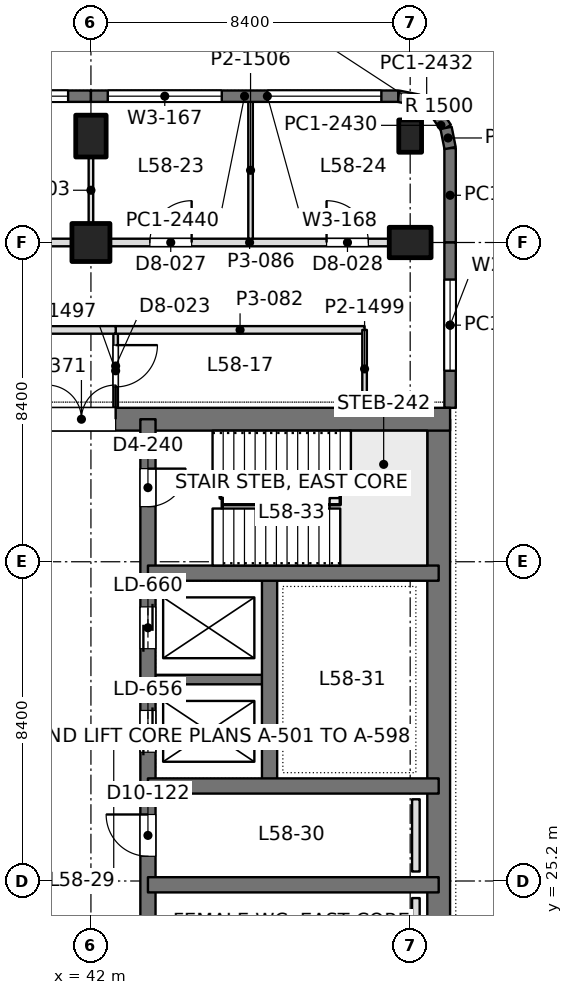
"""IFC4 building model, lengths in metres.
Left out: names, types, materials, properties, quantities, classifications, styles, units other than length and angle.
Written with IfcOpenShell. Run it as: python <this file> out.ifc"""

import sys

from ifc_helpers import new_model, si_unit, direction, frame, frame_2d, origin, origin_2d, place, context, subcontext, project, spatial, rectangle, extrude, element, fill, save


model = new_model("IFC4")
c1 = context("Model", 3, precision=1e-05, world=origin(), true_north=direction((0.0, 1.0)))
c2 = subcontext(c1, "Body", "Model", "MODEL_VIEW")
j1 = project(units=[si_unit("LENGTHUNIT", "METRE"), si_unit("PLANEANGLEUNIT", "RADIAN")], contexts=[c1])
p1 = place(None, origin())
s1 = spatial("IfcSite", under=j1, at=p1, CompositionType="ELEMENT")
p2 = place(p1, origin())
s2 = spatial("IfcBuilding", under=s1, at=p2, CompositionType="ELEMENT")
p3 = place(p2, frame((0.0, 0.0, 254.7)))
s3 = spatial("IfcBuildingStorey", under=s2, at=p3, CompositionType="ELEMENT", Elevation=254.7)
p4 = place(p3, frame((42.0, 42.0, 0.0), z_axis=(0.0, 0.0, 1.0), x_axis=(1.0, 0.0, 0.0)))
e1 = element("IfcColumn", 1, at=p4, inside=s3, PredefinedType="COLUMN", context=c2, shape_type="SweptSolid", body=[
    extrude(rectangle(XDim=1.0, YDim=1.0, at=origin_2d()), origin(), (0.0, 0.0, 1.0), 4.5),
])
for number, where, z_axis, x_axis in (
    (2, (42.0, 44.8, 0.0), (0.0, 0.0, 1.0), (1.0, 0.0, 0.0)),
    (3, (50.4, 42.0, 0.0), (0.0, 0.0, 1.0), (0.0, 1.0, 0.0)),
):
    element("IfcColumn", number, at=place(p3, frame(where, z_axis=z_axis, x_axis=x_axis)), inside=s3, PredefinedType="COLUMN", context=c2, shape_type="SweptSolid", body=[
        extrude(rectangle(XDim=0.8, YDim=1.1, at=origin_2d()), origin(), (0.0, 0.0, 1.0), 4.5),
    ])
p5 = place(p3, frame((50.4, 44.8, 0.0), z_axis=(0.0, 0.0, 1.0), x_axis=(1.0, 0.0, 0.0)))
e4 = element("IfcColumn", 4, at=p5, inside=s3, PredefinedType="COLUMN", context=c2, shape_type="SweptSolid", body=[
    extrude(rectangle(XDim=0.6, YDim=0.85, at=origin_2d()), origin(), (0.0, 0.0, 1.0), 4.5),
])
p6 = place(p3, frame((33.75, 37.35, 0.0), z_axis=(0.0, 0.0, 1.0), x_axis=(1.0, 0.0, 0.0)))
e5 = element("IfcWall", 5, at=p6, inside=s3, PredefinedType="SHEAR", context=c2, shape_type="SweptSolid", body=[
    extrude(rectangle(XDim=17.7, YDim=0.6, at=frame_2d((8.85, 0.0))), origin(), (0.0, 0.0, 1.0), 4.5),
])
p7 = place(p6, frame((7.1, 0.0, 0.0)))
e6 = element("IfcOpeningElement", 6, at=p7, cuts=e5, PredefinedType="OPENING", context=c2, shape_type="SweptSolid", body=[
    extrude(rectangle(XDim=1.8, YDim=2.4, at=frame_2d((0.9, 1.2))), frame((0.0, 0.31, 0.0), z_axis=(0.0, -1.0, 0.0), x_axis=(1.0, 0.0, 0.0)), (0.0, 0.0, 1.0), 0.62),
])
p8 = place(p3, frame((51.15, 13.05, 0.0), z_axis=(0.0, 0.0, 1.0), x_axis=(0.0, 1.0, 0.0)))
e7 = element("IfcWall", 7, at=p8, inside=s3, PredefinedType="SHEAR", context=c2, shape_type="SweptSolid", body=[
    extrude(rectangle(XDim=24.3, YDim=0.6, at=frame_2d((12.15, 0.0))), origin(), (0.0, 0.0, 1.0), 4.5),
])
p9 = place(p3, frame((43.5, 13.05, 0.0), z_axis=(0.0, 0.0, 1.0), x_axis=(0.0, 1.0, 0.0)))
e8 = element("IfcWall", 8, at=p9, inside=s3, PredefinedType="SHEAR", context=c2, shape_type="SweptSolid", body=[
    extrude(rectangle(XDim=24.3, YDim=0.4, at=frame_2d((12.15, 0.0))), origin(), (0.0, 0.0, 1.0), 4.5),
])
p10 = place(p9, frame((1.3, 0.0, 0.0)))
e9 = element("IfcOpeningElement", 9, at=p10, cuts=e8, PredefinedType="OPENING", context=c2, shape_type="SweptSolid", body=[
    extrude(rectangle(XDim=1.0, YDim=2.2, at=frame_2d((0.5, 1.1))), frame((0.0, 0.21, 0.0), z_axis=(0.0, -1.0, 0.0), x_axis=(1.0, 0.0, 0.0)), (0.0, 0.0, 1.0), 0.42),
])
p11 = place(p9, frame((22.0, 0.0, 0.0)))
e10 = element("IfcOpeningElement", 10, at=p11, cuts=e8, PredefinedType="OPENING", context=c2, shape_type="SweptSolid", body=[
    extrude(rectangle(XDim=1.0, YDim=2.2, at=frame_2d((0.5, 1.1))), frame((0.0, 0.21, 0.0), z_axis=(0.0, -1.0, 0.0), x_axis=(1.0, 0.0, 0.0)), (0.0, 0.0, 1.0), 0.42),
])
p12 = place(p9, frame((5.55, 0.0, 0.0)))
e11 = element("IfcOpeningElement", 11, at=p12, cuts=e8, PredefinedType="OPENING", context=c2, shape_type="SweptSolid", body=[
    extrude(rectangle(XDim=1.0, YDim=2.2, at=frame_2d((0.5, 1.1))), frame((0.0, 0.21, 0.0), z_axis=(0.0, -1.0, 0.0), x_axis=(1.0, 0.0, 0.0)), (0.0, 0.0, 1.0), 0.42),
])
p13 = place(p9, frame((9.55, 0.0, 0.0)))
e12 = element("IfcOpeningElement", 12, at=p13, cuts=e8, PredefinedType="OPENING", context=c2, shape_type="SweptSolid", body=[
    extrude(rectangle(XDim=1.0, YDim=2.2, at=frame_2d((0.5, 1.1))), frame((0.0, 0.21, 0.0), z_axis=(0.0, -1.0, 0.0), x_axis=(1.0, 0.0, 0.0)), (0.0, 0.0, 1.0), 0.42),
])
p14 = place(p9, frame((12.8, 0.0, 0.0)))
e13 = element("IfcOpeningElement", 13, at=p14, cuts=e8, PredefinedType="OPENING", context=c2, shape_type="SweptSolid", body=[
    extrude(rectangle(XDim=1.1, YDim=2.2, at=frame_2d((0.55, 1.1))), frame((0.0, 0.21, 0.0), z_axis=(0.0, -1.0, 0.0), x_axis=(1.0, 0.0, 0.0)), (0.0, 0.0, 1.0), 0.42),
])
p15 = place(p9, frame((15.538, 0.0, 0.0)))
e14 = element("IfcOpeningElement", 14, at=p15, cuts=e8, PredefinedType="OPENING", context=c2, shape_type="SweptSolid", body=[
    extrude(rectangle(XDim=1.1, YDim=2.2, at=frame_2d((0.55, 1.1))), frame((0.0, 0.21, 0.0), z_axis=(0.0, -1.0, 0.0), x_axis=(1.0, 0.0, 0.0)), (0.0, 0.0, 1.0), 0.42),
])
p16 = place(p9, frame((18.262, 0.0, 0.0)))
e15 = element("IfcOpeningElement", 15, at=p16, cuts=e8, PredefinedType="OPENING", context=c2, shape_type="SweptSolid", body=[
    extrude(rectangle(XDim=1.1, YDim=2.2, at=frame_2d((0.55, 1.1))), frame((0.0, 0.21, 0.0), z_axis=(0.0, -1.0, 0.0), x_axis=(1.0, 0.0, 0.0)), (0.0, 0.0, 1.0), 0.42),
])
for number, where, z_axis, x_axis in (
    (16, (51.15, 25.1, 0.0), (0.0, 0.0, 1.0), (-1.0, 0.0, 0.0)),
    (17, (51.15, 27.7, 0.0), (0.0, 0.0, 1.0), (-1.0, 0.0, 0.0)),
    (18, (51.15, 33.3, 0.0), (0.0, 0.0, 1.0), (-1.0, 0.0, 0.0)),
):
    element("IfcWall", number, at=place(p3, frame(where, z_axis=z_axis, x_axis=x_axis)), inside=s3, PredefinedType="SHEAR", context=c2, shape_type="SweptSolid", body=[
        extrude(rectangle(XDim=7.65, YDim=0.4, at=frame_2d((3.825, 0.0))), origin(), (0.0, 0.0, 1.0), 4.5),
    ])
p17 = place(p3, frame((46.7, 27.7, 0.0), z_axis=(0.0, 0.0, 1.0), x_axis=(0.0, 1.0, 0.0)))
e19 = element("IfcWall", 19, at=p17, inside=s3, PredefinedType="SHEAR", context=c2, shape_type="SweptSolid", body=[
    extrude(rectangle(XDim=5.6, YDim=0.4, at=frame_2d((2.8, 0.0))), origin(), (0.0, 0.0, 1.0), 4.5),
])
p18 = place(p3, frame((46.7, 30.5, 0.0), z_axis=(0.0, 0.0, 1.0), x_axis=(-1.0, 0.0, 0.0)))
e20 = element("IfcWall", 20, at=p18, inside=s3, PredefinedType="SHEAR", context=c2, shape_type="SweptSolid", body=[
    extrude(rectangle(XDim=3.2, YDim=0.25, at=frame_2d((1.6, 0.0))), origin(), (0.0, 0.0, 1.0), 4.5),
])
p19 = place(p3, frame((33.6, 45.85, 0.0), z_axis=(0.0, 0.0, 1.0), x_axis=(1.0, 0.0, 0.0)))
e21 = element("IfcWall", 21, at=p19, inside=s3, PredefinedType="SOLIDWALL", context=c2, shape_type="SweptSolid", body=[
    extrude(rectangle(XDim=8.4, YDim=0.3, at=frame_2d((4.2, 0.0))), origin(), (0.0, 0.0, 1.0), 4.35),
])
p20 = place(p19, frame((0.6, 0.0, 0.9)))
e22 = element("IfcOpeningElement", 22, at=p20, cuts=e21, PredefinedType="OPENING", context=c2, shape_type="SweptSolid", body=[
    extrude(rectangle(XDim=3.0, YDim=2.4, at=frame_2d((1.5, 1.2))), frame((0.0, 0.16, 0.0), z_axis=(0.0, -1.0, 0.0), x_axis=(1.0, 0.0, 0.0)), (0.0, 0.0, 1.0), 0.32),
])
p21 = place(p19, frame((4.8, 0.0, 0.9)))
e23 = element("IfcOpeningElement", 23, at=p21, cuts=e21, PredefinedType="OPENING", context=c2, shape_type="SweptSolid", body=[
    extrude(rectangle(XDim=3.0, YDim=2.4, at=frame_2d((1.5, 1.2))), frame((0.0, 0.16, 0.0), z_axis=(0.0, -1.0, 0.0), x_axis=(1.0, 0.0, 0.0)), (0.0, 0.0, 1.0), 0.32),
])
p22 = place(p3, frame((42.0, 45.85, 0.0), z_axis=(0.0, 0.0, 1.0), x_axis=(1.0, 0.0, 0.0)))
e24 = element("IfcWall", 24, at=p22, inside=s3, PredefinedType="SOLIDWALL", context=c2, shape_type="SweptSolid", body=[
    extrude(rectangle(XDim=8.085, YDim=0.3, at=frame_2d((4.042, 0.0))), origin(), (0.0, 0.0, 1.0), 4.35),
])
p23 = place(p22, frame((0.443, 0.0, 0.9)))
e25 = element("IfcOpeningElement", 25, at=p23, cuts=e24, PredefinedType="OPENING", context=c2, shape_type="SweptSolid", body=[
    extrude(rectangle(XDim=3.0, YDim=2.4, at=frame_2d((1.5, 1.2))), frame((0.0, 0.16, 0.0), z_axis=(0.0, -1.0, 0.0), x_axis=(1.0, 0.0, 0.0)), (0.0, 0.0, 1.0), 0.32),
])
p24 = place(p22, frame((4.643, 0.0, 0.9)))
e26 = element("IfcOpeningElement", 26, at=p24, cuts=e24, PredefinedType="OPENING", context=c2, shape_type="SweptSolid", body=[
    extrude(rectangle(XDim=3.0, YDim=2.4, at=frame_2d((1.5, 1.2))), frame((0.0, 0.16, 0.0), z_axis=(0.0, -1.0, 0.0), x_axis=(1.0, 0.0, 0.0)), (0.0, 0.0, 1.0), 0.32),
])
p25 = place(p3, frame((50.085, 45.85, 0.0), z_axis=(0.0, 0.0, 1.0), x_axis=(0.980702050465, -0.1955082817, 0.0)))
e27 = element("IfcWall", 27, at=p25, inside=s3, PredefinedType="SOLIDWALL", context=c2, shape_type="SweptSolid", body=[
    extrude(rectangle(XDim=0.541, YDim=0.3, at=frame_2d((0.271, 0.0))), origin(), (0.0, 0.0, 1.0), 4.35),
])
p26 = place(p3, frame((50.615, 45.744, 0.0), z_axis=(0.0, 0.0, 1.0), x_axis=(0.831692711774, -0.555236195849, 0.0)))
e28 = element("IfcWall", 28, at=p26, inside=s3, PredefinedType="SOLIDWALL", context=c2, shape_type="SweptSolid", body=[
    extrude(rectangle(XDim=0.525, YDim=0.3, at=frame_2d((0.263, 0.0))), origin(), (0.0, 0.0, 1.0), 4.35),
])
p27 = place(p3, frame((51.052, 45.453, 0.0), z_axis=(0.0, 0.0, 1.0), x_axis=(0.55534295404, -0.831621430339, 0.0)))
e29 = element("IfcWall", 29, at=p27, inside=s3, PredefinedType="SOLIDWALL", context=c2, shape_type="SweptSolid", body=[
    extrude(rectangle(XDim=0.526, YDim=0.3, at=frame_2d((0.263, 0.0))), origin(), (0.0, 0.0, 1.0), 4.35),
])
p28 = place(p3, frame((51.344, 45.015, 0.0), z_axis=(0.0, 0.0, 1.0), x_axis=(0.195073962632, -0.980788534345, 0.0)))
e30 = element("IfcWall", 30, at=p28, inside=s3, PredefinedType="SOLIDWALL", context=c2, shape_type="SweptSolid", body=[
    extrude(rectangle(XDim=0.541, YDim=0.3, at=frame_2d((0.271, 0.0))), origin(), (0.0, 0.0, 1.0), 4.35),
])
p29 = place(p3, frame((51.45, 44.485, 0.0), z_axis=(0.0, 0.0, 1.0), x_axis=(0.0, -1.0, 0.0)))
e31 = element("IfcWall", 31, at=p29, inside=s3, PredefinedType="SOLIDWALL", context=c2, shape_type="SweptSolid", body=[
    extrude(rectangle(XDim=2.485, YDim=0.3, at=frame_2d((1.243, 0.0))), origin(), (0.0, 0.0, 1.0), 4.35),
])
p30 = place(p3, frame((51.45, 42.0, 0.0), z_axis=(0.0, 0.0, 1.0), x_axis=(0.0, -1.0, 0.0)))
e32 = element("IfcWall", 32, at=p30, inside=s3, PredefinedType="SOLIDWALL", context=c2, shape_type="SweptSolid", body=[
    extrude(rectangle(XDim=4.35, YDim=0.3, at=frame_2d((2.175, 0.0))), origin(), (0.0, 0.0, 1.0), 4.35),
])
p31 = place(p30, frame((0.975, 0.0, 0.9)))
e33 = element("IfcOpeningElement", 33, at=p31, cuts=e32, PredefinedType="OPENING", context=c2, shape_type="SweptSolid", body=[
    extrude(rectangle(XDim=2.4, YDim=1.9, at=frame_2d((1.2, 0.95))), frame((0.0, 0.16, 0.0), z_axis=(0.0, -1.0, 0.0), x_axis=(1.0, 0.0, 0.0)), (0.0, 0.0, 1.0), 0.32),
])
p32 = place(p3, frame((34.249, 42.0, 0.0), z_axis=(0.0, 0.0, 1.0), x_axis=(1.0, 0.0, 0.0)))
e34 = element("IfcWall", 34, at=p32, inside=s3, PredefinedType="PARTITIONING", context=c2, shape_type="SweptSolid", body=[
    extrude(rectangle(XDim=7.252, YDim=0.2, at=frame_2d((3.626, 0.0))), origin(), (0.0, 0.0, 1.0), 3.8),
])
p33 = place(p32, frame((3.001, 0.0, 0.0)))
e35 = element("IfcOpeningElement", 35, at=p33, cuts=e34, PredefinedType="OPENING", context=c2, shape_type="SweptSolid", body=[
    extrude(rectangle(XDim=1.1, YDim=2.4, at=frame_2d((0.55, 1.2))), frame((0.0, 0.11, 0.0), z_axis=(0.0, -1.0, 0.0), x_axis=(1.0, 0.0, 0.0)), (0.0, 0.0, 1.0), 0.22),
])
p34 = place(p3, frame((42.499, 42.0, 0.0), z_axis=(0.0, 0.0, 1.0), x_axis=(1.0, 0.0, 0.0)))
e36 = element("IfcWall", 36, at=p34, inside=s3, PredefinedType="PARTITIONING", context=c2, shape_type="SweptSolid", body=[
    extrude(rectangle(XDim=7.352, YDim=0.2, at=frame_2d((3.676, 0.0))), origin(), (0.0, 0.0, 1.0), 3.8),
])
p35 = place(p34, frame((1.051, 0.0, 0.0)))
e37 = element("IfcOpeningElement", 37, at=p35, cuts=e36, PredefinedType="OPENING", context=c2, shape_type="SweptSolid", body=[
    extrude(rectangle(XDim=1.1, YDim=2.4, at=frame_2d((0.55, 1.2))), frame((0.0, 0.11, 0.0), z_axis=(0.0, -1.0, 0.0), x_axis=(1.0, 0.0, 0.0)), (0.0, 0.0, 1.0), 0.22),
])
p36 = place(p34, frame((5.701, 0.0, 0.0)))
e38 = element("IfcOpeningElement", 38, at=p36, cuts=e36, PredefinedType="OPENING", context=c2, shape_type="SweptSolid", body=[
    extrude(rectangle(XDim=1.1, YDim=2.4, at=frame_2d((0.55, 1.2))), frame((0.0, 0.11, 0.0), z_axis=(0.0, -1.0, 0.0), x_axis=(1.0, 0.0, 0.0)), (0.0, 0.0, 1.0), 0.22),
])
p37 = place(p3, frame((42.0, 42.499, 0.0), z_axis=(0.0, 0.0, 1.0), x_axis=(0.0, 1.0, 0.0)))
e39 = element("IfcWall", 39, at=p37, inside=s3, PredefinedType="PARTITIONING", context=c2, shape_type="SweptSolid", body=[
    extrude(rectangle(XDim=1.752, YDim=0.12, at=frame_2d((0.876, 0.0))), origin(), (0.0, 0.0, 1.0), 3.99),
])
p38 = place(p3, frame((46.2, 42.098, 0.0), z_axis=(0.0, 0.0, 1.0), x_axis=(0.0, 1.0, 0.0)))
e40 = element("IfcWall", 40, at=p38, inside=s3, PredefinedType="PARTITIONING", context=c2, shape_type="SweptSolid", body=[
    extrude(rectangle(XDim=3.604, YDim=0.12, at=frame_2d((1.802, 0.0))), origin(), (0.0, 0.0, 1.0), 3.8),
])
p39 = place(p3, frame((7.748, 39.7, 0.0), z_axis=(0.0, 0.0, 1.0), x_axis=(1.0, 0.0, 0.0)))
e41 = element("IfcWall", 41, at=p39, inside=s3, PredefinedType="PARTITIONING", context=c2, shape_type="SweptSolid", body=[
    extrude(rectangle(XDim=34.904, YDim=0.2, at=frame_2d((17.452, 0.0))), origin(), (0.0, 0.0, 1.0), 3.8),
])
p40 = place(p39, frame((4.919, 0.0, 0.0)))
e42 = element("IfcOpeningElement", 42, at=p40, cuts=e41, PredefinedType="OPENING", context=c2, shape_type="SweptSolid", body=[
    extrude(rectangle(XDim=1.8, YDim=2.2, at=frame_2d((0.9, 1.1))), frame((0.0, 0.11, 0.0), z_axis=(0.0, -1.0, 0.0), x_axis=(1.0, 0.0, 0.0)), (0.0, 0.0, 1.0), 0.22),
])
p41 = place(p39, frame((10.735, 0.0, 0.0)))
e43 = element("IfcOpeningElement", 43, at=p41, cuts=e41, PredefinedType="OPENING", context=c2, shape_type="SweptSolid", body=[
    extrude(rectangle(XDim=1.8, YDim=2.2, at=frame_2d((0.9, 1.1))), frame((0.0, 0.11, 0.0), z_axis=(0.0, -1.0, 0.0), x_axis=(1.0, 0.0, 0.0)), (0.0, 0.0, 1.0), 0.22),
])
p42 = place(p39, frame((22.369, 0.0, 0.0)))
e44 = element("IfcOpeningElement", 44, at=p42, cuts=e41, PredefinedType="OPENING", context=c2, shape_type="SweptSolid", body=[
    extrude(rectangle(XDim=1.8, YDim=2.2, at=frame_2d((0.9, 1.1))), frame((0.0, 0.11, 0.0), z_axis=(0.0, -1.0, 0.0), x_axis=(1.0, 0.0, 0.0)), (0.0, 0.0, 1.0), 0.22),
])
p43 = place(p39, frame((28.185, 0.0, 0.0)))
e45 = element("IfcOpeningElement", 45, at=p43, cuts=e41, PredefinedType="OPENING", context=c2, shape_type="SweptSolid", body=[
    extrude(rectangle(XDim=1.8, YDim=2.2, at=frame_2d((0.9, 1.1))), frame((0.0, 0.11, 0.0), z_axis=(0.0, -1.0, 0.0), x_axis=(1.0, 0.0, 0.0)), (0.0, 0.0, 1.0), 0.22),
])
p44 = place(p3, frame((42.65, 37.648, 0.0), z_axis=(0.0, 0.0, 1.0), x_axis=(0.0, 1.0, 0.0)))
e46 = element("IfcWall", 46, at=p44, inside=s3, PredefinedType="PARTITIONING", context=c2, shape_type="SweptSolid", body=[
    extrude(rectangle(XDim=1.954, YDim=0.12, at=frame_2d((0.977, 0.0))), origin(), (0.0, 0.0, 1.0), 4.35),
])
p45 = place(p44, frame((0.552, 0.0, 0.0)))
e47 = element("IfcOpeningElement", 47, at=p45, cuts=e46, PredefinedType="OPENING", context=c2, shape_type="SweptSolid", body=[
    extrude(rectangle(XDim=1.1, YDim=2.4, at=frame_2d((0.55, 1.2))), frame((0.0, 0.07, 0.0), z_axis=(0.0, -1.0, 0.0), x_axis=(1.0, 0.0, 0.0)), (0.0, 0.0, 1.0), 0.14),
])
p46 = place(p3, frame((42.648, 39.7, 0.0), z_axis=(0.0, 0.0, 1.0), x_axis=(1.0, 0.0, 0.0)))
e48 = element("IfcWall", 48, at=p46, inside=s3, PredefinedType="PARTITIONING", context=c2, shape_type="SweptSolid", body=[
    extrude(rectangle(XDim=6.552, YDim=0.2, at=frame_2d((3.276, 0.0))), origin(), (0.0, 0.0, 1.0), 3.99),
])
p47 = place(p3, frame((49.2, 37.648, 0.0), z_axis=(0.0, 0.0, 1.0), x_axis=(0.0, 1.0, 0.0)))
e49 = element("IfcWall", 49, at=p47, inside=s3, PredefinedType="PARTITIONING", context=c2, shape_type="SweptSolid", body=[
    extrude(rectangle(XDim=2.052, YDim=0.12, at=frame_2d((1.026, 0.0))), origin(), (0.0, 0.0, 1.0), 4.35),
])
p48 = place(p3, frame((50.55, 21.45, 0.0), z_axis=(0.0, 0.0, 1.0), x_axis=(0.0, 1.0, 0.0)))
e50 = element("IfcWall", 50, at=p48, inside=s3, PredefinedType="PLUMBINGWALL", context=c2, shape_type="SweptSolid", body=[
    extrude(rectangle(XDim=3.3, YDim=0.2, at=frame_2d((1.65, 0.0))), origin(), (0.0, 0.0, 1.0), 1.2),
])
p49 = place(p3, frame((50.55, 25.45, 0.0), z_axis=(0.0, 0.0, 1.0), x_axis=(0.0, 1.0, 0.0)))
e51 = element("IfcWall", 51, at=p49, inside=s3, PredefinedType="PLUMBINGWALL", context=c2, shape_type="SweptSolid", body=[
    extrude(rectangle(XDim=1.9, YDim=0.2, at=frame_2d((0.95, 0.0))), origin(), (0.0, 0.0, 1.0), 1.2),
])
p50 = place(p21, origin())
e52 = element("IfcWindow", 52, at=p50, inside=s3, PartitioningType="SINGLE_PANEL", PredefinedType="WINDOW", context=c2, shape_type="SweptSolid", body=[
    extrude(rectangle(XDim=3.0, YDim=2.4, at=frame_2d((1.5, 1.2))), frame((0.0, 0.03, 0.0), z_axis=(0.0, -1.0, 0.0), x_axis=(1.0, 0.0, 0.0)), (0.0, 0.0, 1.0), 0.06),
])
fill(e23, e52)
p51 = place(p23, origin())
e53 = element("IfcWindow", 53, at=p51, inside=s3, PartitioningType="SINGLE_PANEL", PredefinedType="WINDOW", context=c2, shape_type="SweptSolid", body=[
    extrude(rectangle(XDim=3.0, YDim=2.4, at=frame_2d((1.5, 1.2))), frame((0.0, 0.03, 0.0), z_axis=(0.0, -1.0, 0.0), x_axis=(1.0, 0.0, 0.0)), (0.0, 0.0, 1.0), 0.06),
])
fill(e25, e53)
p52 = place(p24, origin())
e54 = element("IfcWindow", 54, at=p52, inside=s3, PartitioningType="SINGLE_PANEL", PredefinedType="WINDOW", context=c2, shape_type="SweptSolid", body=[
    extrude(rectangle(XDim=3.0, YDim=2.4, at=frame_2d((1.5, 1.2))), frame((0.0, 0.03, 0.0), z_axis=(0.0, -1.0, 0.0), x_axis=(1.0, 0.0, 0.0)), (0.0, 0.0, 1.0), 0.06),
])
fill(e26, e54)
p53 = place(p31, origin())
e55 = element("IfcWindow", 55, at=p53, inside=s3, PartitioningType="SINGLE_PANEL", PredefinedType="WINDOW", context=c2, shape_type="SweptSolid", body=[
    extrude(rectangle(XDim=2.4, YDim=1.9, at=frame_2d((1.2, 0.95))), frame((0.0, 0.03, 0.0), z_axis=(0.0, -1.0, 0.0), x_axis=(1.0, 0.0, 0.0)), (0.0, 0.0, 1.0), 0.06),
])
fill(e33, e55)
p54 = place(p7, origin())
e56 = element("IfcDoor", 56, at=p54, inside=s3, OperationType="DOUBLE_DOOR_SINGLE_SWING", PredefinedType="DOOR", context=c2, shape_type="SweptSolid", body=[
    extrude(rectangle(XDim=1.8, YDim=2.4, at=frame_2d((0.9, 1.2))), frame((0.0, 0.025, 0.0), z_axis=(0.0, -1.0, 0.0), x_axis=(1.0, 0.0, 0.0)), (0.0, 0.0, 1.0), 0.05),
])
fill(e6, e56)
p55 = place(p11, frame((1.0, 0.0, 0.0), z_axis=(0.0, 0.0, 1.0), x_axis=(-1.0, 0.0, 0.0)))
e57 = element("IfcDoor", 57, at=p55, inside=s3, OperationType="SINGLE_SWING_LEFT", PredefinedType="DOOR", context=c2, shape_type="SweptSolid", body=[
    extrude(rectangle(XDim=1.0, YDim=2.2, at=frame_2d((0.5, 1.1))), frame((0.0, 0.025, 0.0), z_axis=(0.0, -1.0, 0.0), x_axis=(1.0, 0.0, 0.0)), (0.0, 0.0, 1.0), 0.05),
])
fill(e10, e57)
p56 = place(p14, origin())
e58 = element("IfcDoor", 58, at=p56, inside=s3, OperationType="SINGLE_SWING_RIGHT", PredefinedType="DOOR", context=c2, shape_type="SweptSolid", body=[
    extrude(rectangle(XDim=1.1, YDim=2.2, at=frame_2d((0.55, 1.1))), frame((0.0, 0.025, 0.0), z_axis=(0.0, -1.0, 0.0), x_axis=(1.0, 0.0, 0.0)), (0.0, 0.0, 1.0), 0.05),
])
fill(e13, e58)
p57 = place(p15, origin())
e59 = element("IfcDoor", 59, at=p57, inside=s3, OperationType="DOUBLE_DOOR_SLIDING", PredefinedType="DOOR", context=c2, shape_type="SweptSolid", body=[
    extrude(rectangle(XDim=1.1, YDim=2.2, at=frame_2d((0.55, 1.1))), frame((0.0, 0.025, 0.0), z_axis=(0.0, -1.0, 0.0), x_axis=(1.0, 0.0, 0.0)), (0.0, 0.0, 1.0), 0.05),
])
fill(e14, e59)
p58 = place(p16, origin())
e60 = element("IfcDoor", 60, at=p58, inside=s3, OperationType="DOUBLE_DOOR_SLIDING", PredefinedType="DOOR", context=c2, shape_type="SweptSolid", body=[
    extrude(rectangle(XDim=1.1, YDim=2.2, at=frame_2d((0.55, 1.1))), frame((0.0, 0.025, 0.0), z_axis=(0.0, -1.0, 0.0), x_axis=(1.0, 0.0, 0.0)), (0.0, 0.0, 1.0), 0.05),
])
fill(e15, e60)
p59 = place(p35, origin())
e61 = element("IfcDoor", 61, at=p59, inside=s3, OperationType="SINGLE_SWING_RIGHT", PredefinedType="DOOR", context=c2, shape_type="SweptSolid", body=[
    extrude(rectangle(XDim=1.1, YDim=2.4, at=frame_2d((0.55, 1.2))), frame((0.0, 0.025, 0.0), z_axis=(0.0, -1.0, 0.0), x_axis=(1.0, 0.0, 0.0)), (0.0, 0.0, 1.0), 0.05),
])
fill(e37, e61)
p60 = place(p36, origin())
e62 = element("IfcDoor", 62, at=p60, inside=s3, OperationType="SINGLE_SWING_LEFT", PredefinedType="DOOR", context=c2, shape_type="SweptSolid", body=[
    extrude(rectangle(XDim=1.1, YDim=2.4, at=frame_2d((0.55, 1.2))), frame((0.0, 0.025, 0.0), z_axis=(0.0, -1.0, 0.0), x_axis=(1.0, 0.0, 0.0)), (0.0, 0.0, 1.0), 0.05),
])
fill(e38, e62)
p61 = place(p45, frame((1.1, 0.0, 0.0), z_axis=(0.0, 0.0, 1.0), x_axis=(-1.0, 0.0, 0.0)))
e63 = element("IfcDoor", 63, at=p61, inside=s3, OperationType="SINGLE_SWING_LEFT", PredefinedType="DOOR", context=c2, shape_type="SweptSolid", body=[
    extrude(rectangle(XDim=1.1, YDim=2.4, at=frame_2d((0.55, 1.2))), frame((0.0, 0.025, 0.0), z_axis=(0.0, -1.0, 0.0), x_axis=(1.0, 0.0, 0.0)), (0.0, 0.0, 1.0), 0.05),
])
fill(e47, e63)
save(model, sys.argv[1])
